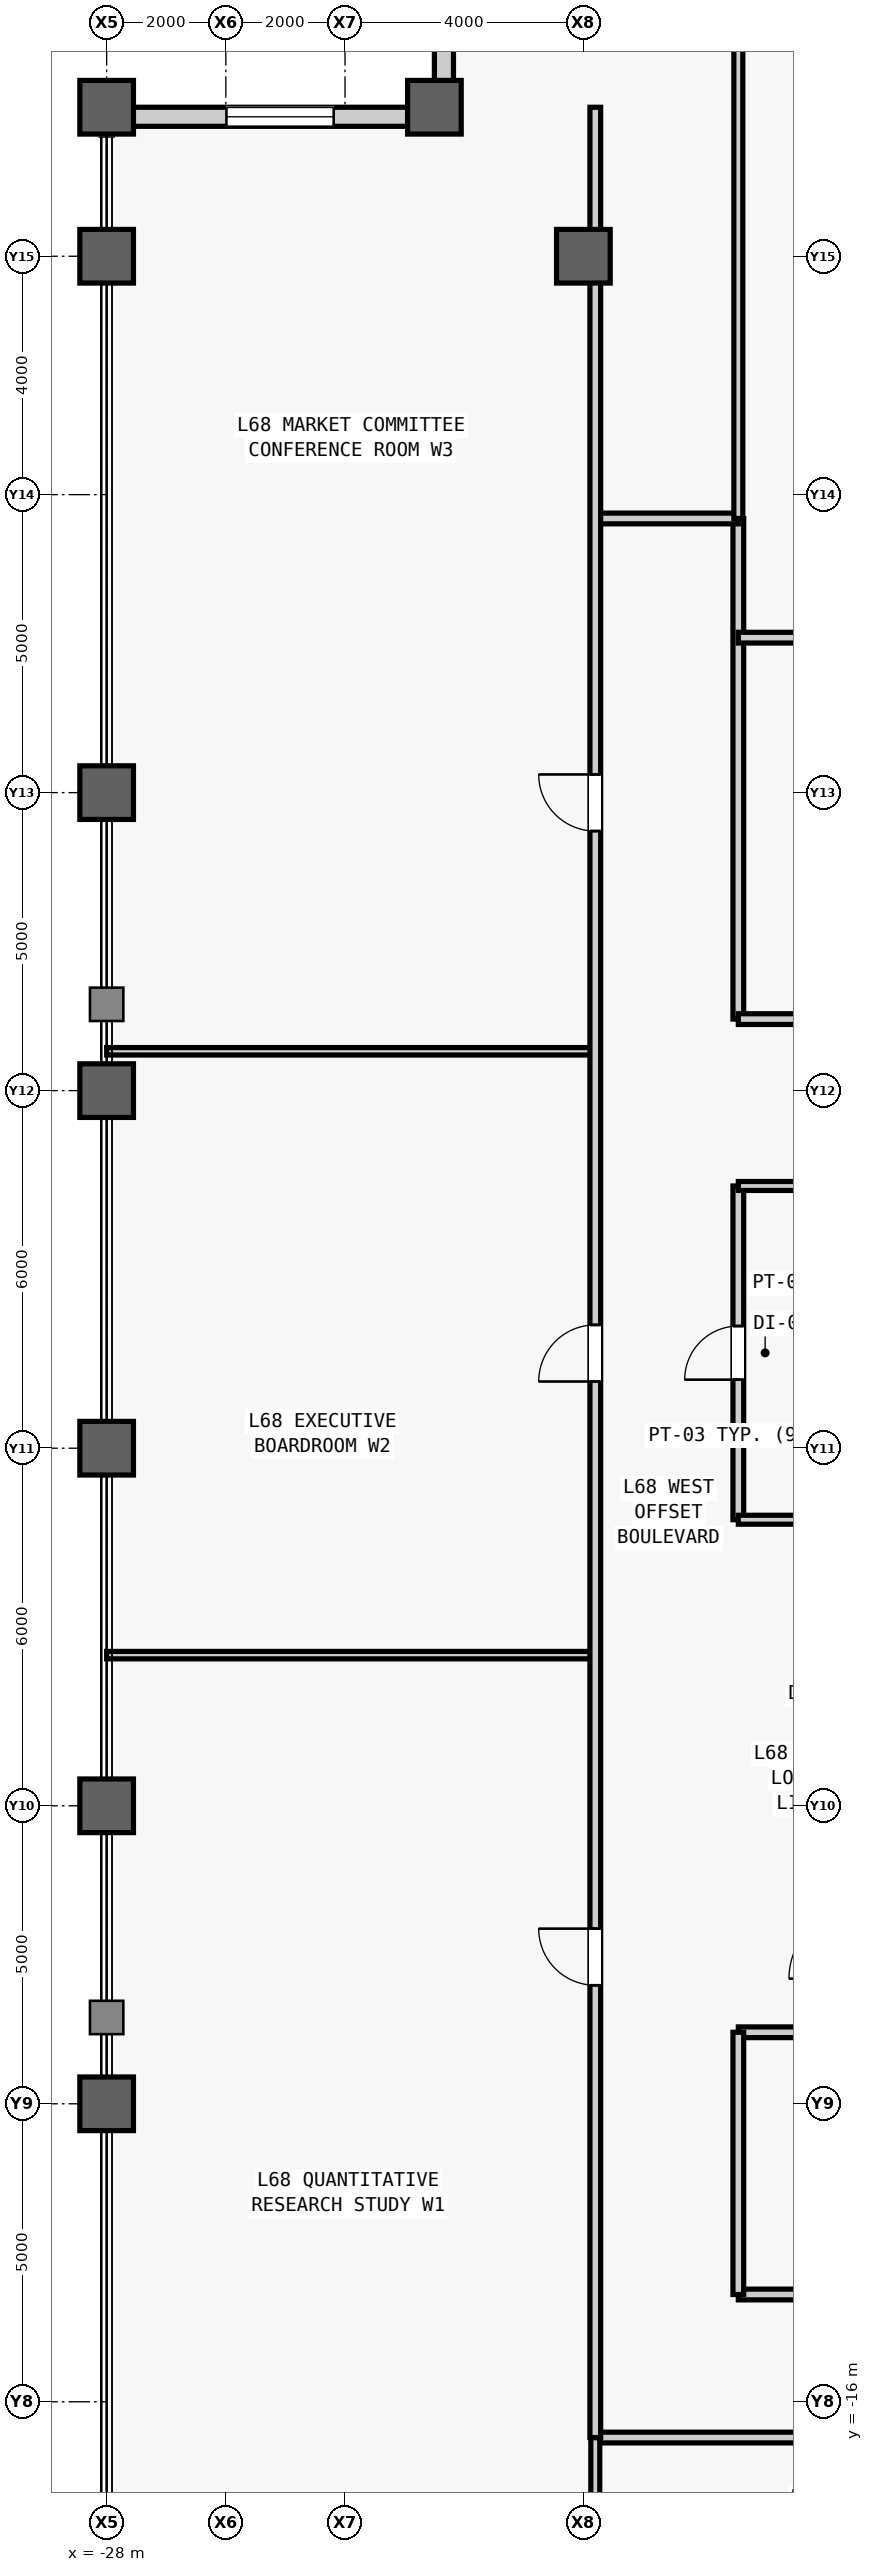
"""IFC4 building model, lengths in metres.
Left out: names, types, materials, properties, quantities, classifications, styles, units other than length and angle.
Written with IfcOpenShell. Run it as: python <this file> out.ifc"""

import sys

from ifc_helpers import new_model, si_unit, direction, frame, frame_2d, origin, origin_2d, place, context, subcontext, project, spatial, rectangle, hollow_rectangle, extrude, source, transform, mapped, element, fill, save


model = new_model("IFC4")
c1 = context("Model", 3, precision=1e-05, world=origin(), true_north=direction((0.0, 1.0)))
c2 = subcontext(c1, "Body", "Model", "MODEL_VIEW")
j1 = project(units=[si_unit("LENGTHUNIT", "METRE"), si_unit("PLANEANGLEUNIT", "RADIAN")], contexts=[c1])
p1 = place(None, origin())
s1 = spatial("IfcSite", under=j1, at=p1, CompositionType="ELEMENT")
p2 = place(p1, origin())
s2 = spatial("IfcBuilding", under=s1, at=p2, CompositionType="ELEMENT")
p3 = place(p2, frame((0.0, 0.0, 289.5)))
s3 = spatial("IfcBuildingStorey", under=s2, at=p3, CompositionType="ELEMENT", Elevation=289.5)
m1 = source(origin(), c2, "Body", "SweptSolid", [
    extrude(hollow_rectangle(XDim=0.9, YDim=0.9, WallThickness=0.05, at=origin_2d()), origin(), (0.0, 0.0, 1.0), 4.0),
])
for number, where, z_axis, x_axis in (
    (1, (-28.0, -11.0, 0.0), (0.0, 0.0, 1.0), (1.0, 0.0, 0.0)),
    (2, (-28.0, -6.0, 0.0), (0.0, 0.0, 1.0), (1.0, 0.0, 0.0)),
    (3, (-28.0, 0.0, 0.0), (0.0, 0.0, 1.0), (1.0, 0.0, 0.0)),
    (4, (-28.0, 6.0, 0.0), (0.0, 0.0, 1.0), (1.0, 0.0, 0.0)),
    (5, (-28.0, 11.0, 0.0), (0.0, 0.0, 1.0), (1.0, 0.0, 0.0)),
    (6, (-28.0, 20.0, 0.0), (0.0, 0.0, 1.0), (1.0, 0.0, 0.0)),
    (7, (-28.0, 22.5, 0.0), (0.0, 0.0, 1.0), (1.0, 0.0, 0.0)),
    (8, (-22.5, 22.5, 0.0), (0.0, 0.0, 1.0), (1.0, 0.0, 0.0)),
    (9, (-20.0, 20.0, 0.0), (0.0, 0.0, 1.0), (1.0, 0.0, 0.0)),
):
    element("IfcColumn", number, at=place(p3, frame(where, z_axis=z_axis, x_axis=x_axis)), inside=s3, PredefinedType="COLUMN", context=c2, shape_type="MappedRepresentation", body=[
        mapped(m1, transform((0.0, 0.0, 0.0), scale=1.0)),
    ])
m2 = source(origin(), c2, "Body", "SweptSolid", [
    extrude(rectangle(XDim=5.18, YDim=0.32, at=frame_2d((2.59, 0.0))), origin(), (0.0, 0.0, 1.0), 3.231),
])
p4 = place(p3, frame((-22.34, 22.5, 0.0), z_axis=(0.0, 0.0, 1.0), x_axis=(0.0, 1.0, 0.0)))
e10 = element("IfcWall", 10, at=p4, inside=s3, PredefinedType="STANDARD", context=c2, shape_type="MappedRepresentation", body=[
    mapped(m2, transform((0.0, 0.0, 0.0), scale=1.0)),
])
m3 = source(origin(), c2, "Body", "SweptSolid", [
    extrude(rectangle(XDim=1.8, YDim=2.4, at=frame_2d((0.9, 1.2))), frame((0.0, 0.17, 0.0), z_axis=(0.0, -1.0, 0.0), x_axis=(1.0, 0.0, 0.0)), (0.0, 0.0, 1.0), 0.34),
])
p5 = place(p4, frame((1.69, 0.0, 0.5)))
e11 = element("IfcOpeningElement", 11, at=p5, cuts=e10, PredefinedType="OPENING", context=c2, shape_type="MappedRepresentation", body=[
    mapped(m3, transform((0.0, 0.0, 0.0), scale=1.0)),
])
p6 = place(p3, frame((-22.5, 22.34, 0.0), z_axis=(0.0, 0.0, 1.0), x_axis=(-1.0, 0.0, 0.0)))
e12 = element("IfcWall", 12, at=p6, inside=s3, PredefinedType="STANDARD", context=c2, shape_type="MappedRepresentation", body=[
    mapped(m2, transform((0.0, 0.0, 0.0), scale=1.0)),
])
p7 = place(p6, frame((1.69, 0.0, 0.5)))
e13 = element("IfcOpeningElement", 13, at=p7, cuts=e12, PredefinedType="OPENING", context=c2, shape_type="MappedRepresentation", body=[
    mapped(m3, transform((0.0, 0.0, 0.0), scale=1.0)),
])
m4 = source(origin(), c2, "Body", "SweptSolid", [
    extrude(rectangle(XDim=5.6, YDim=0.18, at=frame_2d((2.8, 0.0))), origin(), (0.0, 0.0, 1.0), 3.78),
])
p8 = place(p3, frame((-17.4, -1.2, 0.0), z_axis=(0.0, 0.0, 1.0), x_axis=(0.0, 1.0, 0.0)))
e14 = element("IfcWall", 14, at=p8, inside=s3, PredefinedType="PARTITIONING", context=c2, shape_type="MappedRepresentation", body=[
    mapped(m4, transform((0.0, 0.0, 0.0), scale=1.0)),
])
m5 = source(origin(), c2, "Body", "SweptSolid", [
    extrude(rectangle(XDim=0.9, YDim=2.15, at=frame_2d((0.45, 1.075))), frame((0.0, 0.1, 0.0), z_axis=(0.0, -1.0, 0.0), x_axis=(1.0, 0.0, 0.0)), (0.0, 0.0, 1.0), 0.2),
])
p9 = place(p8, frame((2.35, 0.0, 0.0)))
e15 = element("IfcOpeningElement", 15, at=p9, cuts=e14, PredefinedType="OPENING", context=c2, shape_type="MappedRepresentation", body=[
    mapped(m5, transform((0.0, 0.0, 0.0), scale=1.0)),
])
m6 = source(origin(), c2, "Body", "SweptSolid", [
    extrude(rectangle(XDim=2.05, YDim=0.15, at=frame_2d((1.025, 0.0))), origin(), (0.0, 0.0, 1.0), 3.78),
])
for number, where, z_axis, x_axis in (
    (16, (-17.4, -1.2, 0.0), (0.0, 0.0, 1.0), (1.0, 0.0, 0.0)),
    (17, (-17.4, 4.4, 0.0), (0.0, 0.0, 1.0), (1.0, 0.0, 0.0)),
):
    element("IfcWall", number, at=place(p3, frame(where, z_axis=z_axis, x_axis=x_axis)), inside=s3, PredefinedType="PARTITIONING", context=c2, shape_type="MappedRepresentation", body=[
        mapped(m6, transform((0.0, 0.0, 0.0), scale=1.0)),
    ])
m7 = source(origin(), c2, "Body", "SweptSolid", [
    extrude(rectangle(XDim=2.05, YDim=0.18, at=frame_2d((1.025, 0.0))), origin(), (0.0, 0.0, 1.0), 3.78),
])
p10 = place(p3, frame((-17.4, -9.8, 0.0), z_axis=(0.0, 0.0, 1.0), x_axis=(1.0, 0.0, 0.0)))
e18 = element("IfcWall", 18, at=p10, inside=s3, PredefinedType="PARTITIONING", context=c2, shape_type="MappedRepresentation", body=[
    mapped(m7, transform((0.0, 0.0, 0.0), scale=1.0)),
])
m8 = source(origin(), c2, "Body", "SweptSolid", [
    extrude(rectangle(XDim=8.4, YDim=0.18, at=frame_2d((4.2, 0.0))), origin(), (0.0, 0.0, 1.0), 3.78),
])
p11 = place(p3, frame((-17.4, 7.2, 0.0), z_axis=(0.0, 0.0, 1.0), x_axis=(0.0, 1.0, 0.0)))
e19 = element("IfcWall", 19, at=p11, inside=s3, PredefinedType="PARTITIONING", context=c2, shape_type="MappedRepresentation", body=[
    mapped(m8, transform((0.0, 0.0, 0.0), scale=1.0)),
])
p12 = place(p3, frame((-17.4, 7.2, 0.0), z_axis=(0.0, 0.0, 1.0), x_axis=(1.0, 0.0, 0.0)))
e20 = element("IfcWall", 20, at=p12, inside=s3, PredefinedType="PARTITIONING", context=c2, shape_type="MappedRepresentation", body=[
    mapped(m7, transform((0.0, 0.0, 0.0), scale=1.0)),
])
m9 = source(origin(), c2, "Body", "SweptSolid", [
    extrude(rectangle(XDim=16.1, YDim=0.18, at=frame_2d((8.05, 0.0))), origin(), (0.0, 0.0, 1.0), 3.78),
])
p13 = place(p3, frame((-17.4, -14.2, 0.0), z_axis=(0.0, 0.0, 1.0), x_axis=(1.0, 0.0, 0.0)))
e21 = element("IfcWall", 21, at=p13, inside=s3, PredefinedType="PARTITIONING", context=c2, shape_type="MappedRepresentation", body=[
    mapped(m9, transform((0.0, 0.0, 0.0), scale=1.0)),
])
p14 = place(p13, frame((8.95, 0.0, 0.0)))
e22 = element("IfcOpeningElement", 22, at=p14, cuts=e21, PredefinedType="OPENING", context=c2, shape_type="MappedRepresentation", body=[
    mapped(m5, transform((0.0, 0.0, 0.0), scale=1.0)),
])
m10 = source(origin(), c2, "Body", "SweptSolid", [
    extrude(rectangle(XDim=4.4, YDim=0.18, at=frame_2d((2.2, 0.0))), origin(), (0.0, 0.0, 1.0), 3.78),
])
p15 = place(p3, frame((-17.4, -14.2, 0.0), z_axis=(0.0, 0.0, 1.0), x_axis=(0.0, 1.0, 0.0)))
e23 = element("IfcWall", 23, at=p15, inside=s3, PredefinedType="PARTITIONING", context=c2, shape_type="MappedRepresentation", body=[
    mapped(m10, transform((0.0, 0.0, 0.0), scale=1.0)),
])
m11 = source(origin(), c2, "Body", "SweptSolid", [
    extrude(rectangle(XDim=2.4, YDim=0.18, at=frame_2d((1.2, 0.0))), origin(), (0.0, 0.0, 1.0), 3.78),
])
p16 = place(p3, frame((-19.8, 15.6, 0.0), z_axis=(0.0, 0.0, 1.0), x_axis=(1.0, 0.0, 0.0)))
e24 = element("IfcWall", 24, at=p16, inside=s3, PredefinedType="PARTITIONING", context=c2, shape_type="MappedRepresentation", body=[
    mapped(m11, transform((0.0, 0.0, 0.0), scale=1.0)),
])
m12 = source(origin(), c2, "Body", "SweptSolid", [
    extrude(rectangle(XDim=37.55, YDim=0.18, at=frame_2d((18.775, 0.0))), origin(), (0.0, 0.0, 1.0), 3.78),
])
p17 = place(p3, frame((-19.8, -16.6, 0.0), z_axis=(0.0, 0.0, 1.0), x_axis=(1.0, 0.0, 0.0)))
e25 = element("IfcWall", 25, at=p17, inside=s3, PredefinedType="PARTITIONING", context=c2, shape_type="MappedRepresentation", body=[
    mapped(m12, transform((0.0, 0.0, 0.0), scale=1.0)),
])
m13 = source(origin(), c2, "Body", "SweptSolid", [
    extrude(rectangle(XDim=1.05, YDim=2.2, at=frame_2d((0.525, 1.1))), frame((0.0, 0.1, 0.0), z_axis=(0.0, -1.0, 0.0), x_axis=(1.0, 0.0, 0.0)), (0.0, 0.0, 1.0), 0.2),
])
p18 = place(p17, frame((4.481, 0.0, 0.0)))
e26 = element("IfcOpeningElement", 26, at=p18, cuts=e25, PredefinedType="OPENING", context=c2, shape_type="MappedRepresentation", body=[
    mapped(m13, transform((0.0, 0.0, 0.0), scale=1.0)),
])
p19 = place(p17, frame((14.119, 0.0, 0.0)))
e27 = element("IfcOpeningElement", 27, at=p19, cuts=e25, PredefinedType="OPENING", context=c2, shape_type="MappedRepresentation", body=[
    mapped(m13, transform((0.0, 0.0, 0.0), scale=1.0)),
])
p20 = place(p17, frame((24.634, 0.0, 0.0)))
e28 = element("IfcOpeningElement", 28, at=p20, cuts=e25, PredefinedType="OPENING", context=c2, shape_type="MappedRepresentation", body=[
    mapped(m13, transform((0.0, 0.0, 0.0), scale=1.0)),
])
p21 = place(p17, frame((32.745, 0.0, 0.0)))
e29 = element("IfcOpeningElement", 29, at=p21, cuts=e25, PredefinedType="OPENING", context=c2, shape_type="MappedRepresentation", body=[
    mapped(m13, transform((0.0, 0.0, 0.0), scale=1.0)),
])
m14 = source(origin(), c2, "Body", "SweptSolid", [
    extrude(rectangle(XDim=11.4, YDim=0.15, at=frame_2d((5.7, 0.0))), origin(), (0.0, 0.0, 1.0), 3.164),
])
p22 = place(p3, frame((-19.8, -28.0, 0.0), z_axis=(0.0, 0.0, 1.0), x_axis=(0.0, 1.0, 0.0)))
e30 = element("IfcWall", 30, at=p22, inside=s3, PredefinedType="PARTITIONING", context=c2, shape_type="MappedRepresentation", body=[
    mapped(m14, transform((0.0, 0.0, 0.0), scale=1.0)),
])
m15 = source(origin(), c2, "Body", "SweptSolid", [
    extrude(rectangle(XDim=32.75, YDim=0.18, at=frame_2d((16.375, 0.0))), origin(), (0.0, 0.0, 1.0), 3.78),
])
p23 = place(p3, frame((-17.4, 13.6, 0.0), z_axis=(0.0, 0.0, 1.0), x_axis=(1.0, 0.0, 0.0)))
e31 = element("IfcWall", 31, at=p23, inside=s3, PredefinedType="PARTITIONING", context=c2, shape_type="MappedRepresentation", body=[
    mapped(m15, transform((0.0, 0.0, 0.0), scale=1.0)),
])
p24 = place(p23, frame((27.075, 0.0, 0.0)))
e32 = element("IfcOpeningElement", 32, at=p24, cuts=e31, PredefinedType="OPENING", context=c2, shape_type="MappedRepresentation", body=[
    mapped(m13, transform((0.0, 0.0, 0.0), scale=1.0)),
])
m16 = source(origin(), c2, "Body", "SweptSolid", [
    extrude(rectangle(XDim=12.4, YDim=0.15, at=frame_2d((6.2, 0.0))), origin(), (0.0, 0.0, 1.0), 3.78),
])
p25 = place(p3, frame((-17.4, 15.6, 0.0), z_axis=(0.0, 0.0, 1.0), x_axis=(0.0, 1.0, 0.0)))
e33 = element("IfcWall", 33, at=p25, inside=s3, PredefinedType="PARTITIONING", context=c2, shape_type="MappedRepresentation", body=[
    mapped(m16, transform((0.0, 0.0, 0.0), scale=1.0)),
])
m17 = source(origin(), c2, "Body", "SweptSolid", [
    extrude(rectangle(XDim=8.2, YDim=0.125, at=frame_2d((4.1, 0.0))), origin(), (0.0, 0.0, 1.0), 3.78),
])
for number, where, z_axis, x_axis in (
    (34, (-28.0, -3.472, 0.0), (0.0, 0.0, 1.0), (1.0, 0.0, 0.0)),
    (35, (-28.0, 6.66, 0.0), (0.0, 0.0, 1.0), (1.0, 0.0, 0.0)),
):
    element("IfcWall", number, at=place(p3, frame(where, z_axis=z_axis, x_axis=x_axis)), inside=s3, PredefinedType="PARTITIONING", context=c2, shape_type="MappedRepresentation", body=[
        mapped(m17, transform((0.0, 0.0, 0.0), scale=1.0)),
    ])
m18 = source(origin(), c2, "Body", "SweptSolid", [
    extrude(rectangle(XDim=39.1, YDim=0.18, at=frame_2d((19.55, 0.0))), origin(), (0.0, 0.0, 1.0), 3.164),
])
p26 = place(p3, frame((-19.8, -16.6, 0.0), z_axis=(0.0, 0.0, 1.0), x_axis=(0.0, 1.0, 0.0)))
e36 = element("IfcWall", 36, at=p26, inside=s3, PredefinedType="PARTITIONING", context=c2, shape_type="MappedRepresentation", body=[
    mapped(m18, transform((0.0, 0.0, 0.0), scale=1.0)),
])
m19 = source(origin(), c2, "Body", "SweptSolid", [
    extrude(rectangle(XDim=0.95, YDim=2.15, at=frame_2d((0.475, 1.075))), frame((0.0, 0.1, 0.0), z_axis=(0.0, -1.0, 0.0), x_axis=(1.0, 0.0, 0.0)), (0.0, 0.0, 1.0), 0.2),
])
p27 = place(p26, frame((7.589, 0.0, 0.0)))
e37 = element("IfcOpeningElement", 37, at=p27, cuts=e36, PredefinedType="OPENING", context=c2, shape_type="MappedRepresentation", body=[
    mapped(m19, transform((0.0, 0.0, 0.0), scale=1.0)),
])
p28 = place(p26, frame((17.719, 0.0, 0.0)))
e38 = element("IfcOpeningElement", 38, at=p28, cuts=e36, PredefinedType="OPENING", context=c2, shape_type="MappedRepresentation", body=[
    mapped(m19, transform((0.0, 0.0, 0.0), scale=1.0)),
])
p29 = place(p26, frame((26.955, 0.0, 0.0)))
e39 = element("IfcOpeningElement", 39, at=p29, cuts=e36, PredefinedType="OPENING", context=c2, shape_type="MappedRepresentation", body=[
    mapped(m19, transform((0.0, 0.0, 0.0), scale=1.0)),
])
m20 = source(origin(), c2, "Body", "SweptSolid", [
    extrude(rectangle(XDim=1.8, YDim=2.4, at=frame_2d((0.9, 1.2))), frame((0.0, 0.03, 0.0), z_axis=(0.0, -1.0, 0.0), x_axis=(1.0, 0.0, 0.0)), (0.0, 0.0, 1.0), 0.06),
])
p30 = place(p7, origin())
e40 = element("IfcWindow", 40, at=p30, inside=s3, PartitioningType="SINGLE_PANEL", PredefinedType="WINDOW", context=c2, shape_type="MappedRepresentation", body=[
    mapped(m20, transform((0.0, 0.0, 0.0), scale=1.0)),
])
fill(e13, e40)
m21 = source(origin(), c2, "Body", "SweptSolid", [
    extrude(rectangle(XDim=0.9, YDim=2.15, at=frame_2d((0.45, 1.075))), frame((0.0, 0.025, 0.0), z_axis=(0.0, -1.0, 0.0), x_axis=(1.0, 0.0, 0.0)), (0.0, 0.0, 1.0), 0.05),
])
p31 = place(p9, origin())
e41 = element("IfcDoor", 41, at=p31, inside=s3, OperationType="SINGLE_SWING_LEFT", PredefinedType="DOOR", context=c2, shape_type="MappedRepresentation", body=[
    mapped(m21, transform((0.0, 0.0, 0.0), scale=1.0)),
])
fill(e15, e41)
m22 = source(origin(), c2, "Body", "SweptSolid", [
    extrude(rectangle(XDim=0.95, YDim=2.15, at=frame_2d((0.475, 1.075))), frame((0.0, 0.025, 0.0), z_axis=(0.0, -1.0, 0.0), x_axis=(1.0, 0.0, 0.0)), (0.0, 0.0, 1.0), 0.05),
])
p32 = place(p27, origin())
e42 = element("IfcDoor", 42, at=p32, inside=s3, OperationType="SINGLE_SWING_RIGHT", PredefinedType="DOOR", context=c2, shape_type="MappedRepresentation", body=[
    mapped(m22, transform((0.0, 0.0, 0.0), scale=1.0)),
])
fill(e37, e42)
p33 = place(p28, origin())
e43 = element("IfcDoor", 43, at=p33, inside=s3, OperationType="SINGLE_SWING_LEFT", PredefinedType="DOOR", context=c2, shape_type="MappedRepresentation", body=[
    mapped(m22, transform((0.0, 0.0, 0.0), scale=1.0)),
])
fill(e38, e43)
p34 = place(p29, origin())
e44 = element("IfcDoor", 44, at=p34, inside=s3, OperationType="SINGLE_SWING_RIGHT", PredefinedType="DOOR", context=c2, shape_type="MappedRepresentation", body=[
    mapped(m22, transform((0.0, 0.0, 0.0), scale=1.0)),
])
fill(e39, e44)
save(model, sys.argv[1])
